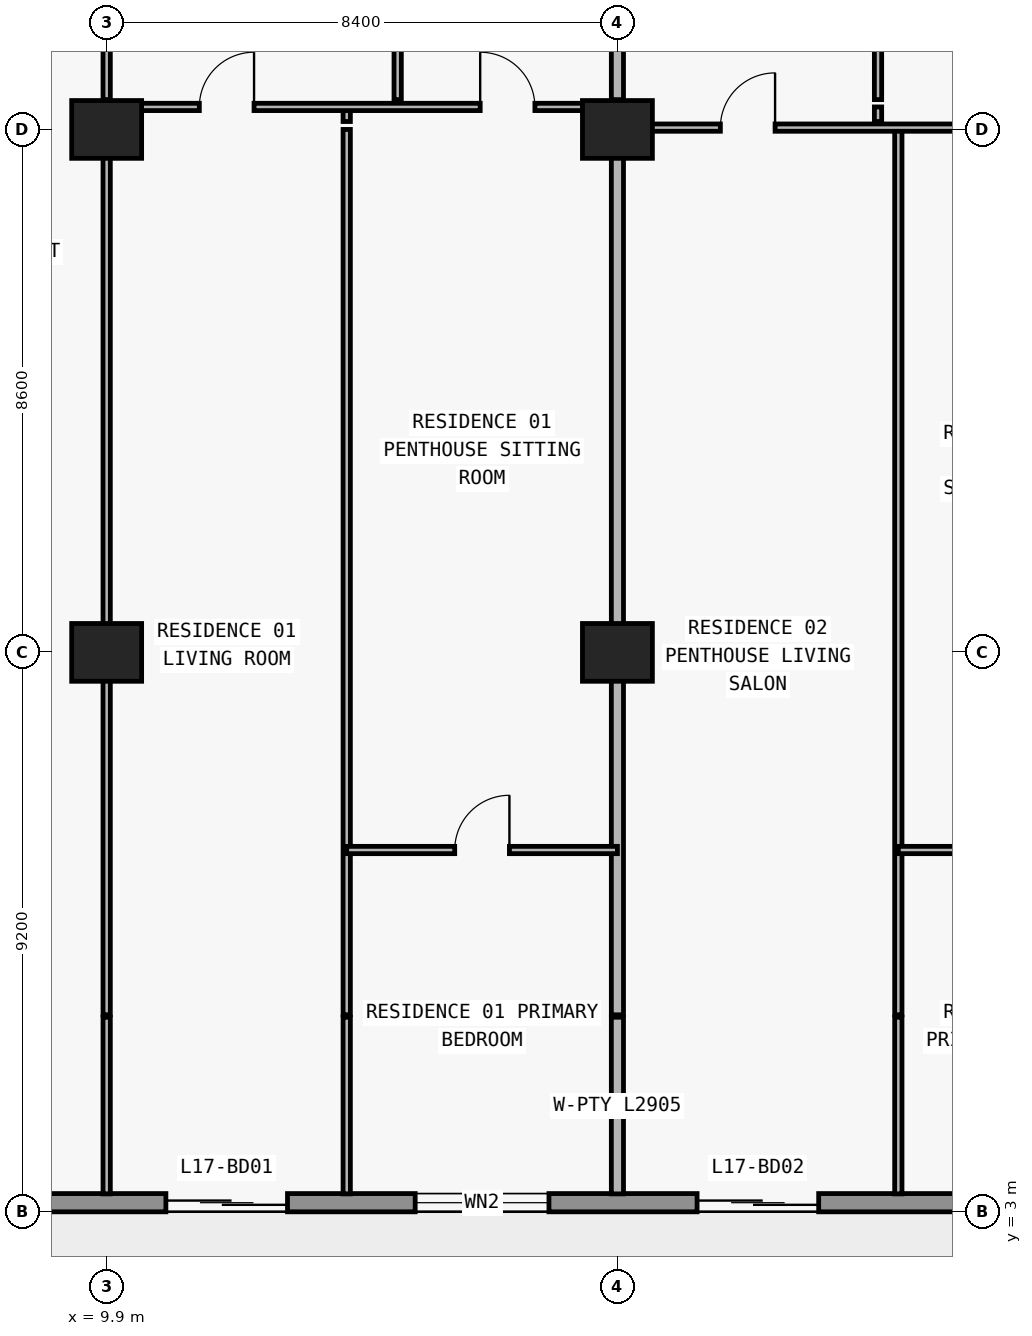
"""IFC4 building model, lengths in metres.
Left out: names, types, materials, properties, quantities, classifications, styles, units other than length and angle.
Written with IfcOpenShell. Run it as: python <this file> out.ifc"""

import sys

from ifc_helpers import new_model, si_unit, direction, frame, frame_2d, origin, origin_2d, place, context, subcontext, project, spatial, rectangle, extrude, element, fill, save


model = new_model("IFC4")
c1 = context("Model", 3, precision=1e-05, world=origin(), true_north=direction((0.0, 1.0)))
c2 = subcontext(c1, "Body", "Model", "MODEL_VIEW")
j1 = project(units=[si_unit("LENGTHUNIT", "METRE"), si_unit("PLANEANGLEUNIT", "RADIAN")], contexts=[c1])
p1 = place(None, origin())
s1 = spatial("IfcSite", under=j1, at=p1, CompositionType="ELEMENT")
p2 = place(p1, origin())
s2 = spatial("IfcBuilding", under=s1, at=p2, CompositionType="ELEMENT")
p3 = place(p2, frame((0.0, 0.0, 66.3)))
s3 = spatial("IfcBuildingStorey", under=s2, at=p3, CompositionType="ELEMENT", Elevation=66.3)
for number, where, z_axis, x_axis in (
    (1, (9.9, 12.2, 0.0), (0.0, 0.0, 1.0), (1.0, 0.0, 0.0)),
    (2, (18.3, 12.2, 0.0), (0.0, 0.0, 1.0), (1.0, 0.0, 0.0)),
    (3, (9.9, 20.8, 0.0), (0.0, 0.0, 1.0), (1.0, 0.0, 0.0)),
    (4, (18.3, 20.8, 0.0), (0.0, 0.0, 1.0), (1.0, 0.0, 0.0)),
):
    element("IfcColumn", number, at=place(p3, frame(where, z_axis=z_axis, x_axis=x_axis)), inside=s3, PredefinedType="COLUMN", context=c2, shape_type="SweptSolid", body=[
        extrude(rectangle(XDim=1.15, YDim=0.95, at=origin_2d()), origin(), (0.0, 0.0, 1.0), 3.05),
    ])
p4 = place(p3, frame((72.7, 3.15, 0.0), z_axis=(0.0, 0.0, 1.0), x_axis=(-1.0, 0.0, 0.0)))
e5 = element("IfcWall", 5, at=p4, inside=s3, PredefinedType="STANDARD", context=c2, shape_type="SweptSolid", body=[
    extrude(rectangle(XDim=67.6, YDim=0.3, at=frame_2d((33.8, 0.0))), origin(), (0.0, 0.0, 1.0), 3.05),
])
p5 = place(p4, frame((59.826, 0.0, 0.0)))
e6 = element("IfcOpeningElement", 6, at=p5, cuts=e5, PredefinedType="OPENING", context=c2, shape_type="SweptSolid", body=[
    extrude(rectangle(XDim=2.0, YDim=2.3, at=frame_2d((1.0, 1.15))), frame((0.0, 0.16, 0.0), z_axis=(0.0, -1.0, 0.0), x_axis=(1.0, 0.0, 0.0)), (0.0, 0.0, 1.0), 0.32),
])
p6 = place(p4, frame((55.526, 0.0, 0.85)))
e7 = element("IfcOpeningElement", 7, at=p6, cuts=e5, PredefinedType="OPENING", context=c2, shape_type="SweptSolid", body=[
    extrude(rectangle(XDim=2.2, YDim=1.55, at=frame_2d((1.1, 0.775))), frame((0.0, 0.16, 0.0), z_axis=(0.0, -1.0, 0.0), x_axis=(1.0, 0.0, 0.0)), (0.0, 0.0, 1.0), 0.32),
])
p7 = place(p4, frame((51.09, 0.0, 0.0)))
e8 = element("IfcOpeningElement", 8, at=p7, cuts=e5, PredefinedType="OPENING", context=c2, shape_type="SweptSolid", body=[
    extrude(rectangle(XDim=2.0, YDim=2.3, at=frame_2d((1.0, 1.15))), frame((0.0, 0.16, 0.0), z_axis=(0.0, -1.0, 0.0), x_axis=(1.0, 0.0, 0.0)), (0.0, 0.0, 1.0), 0.32),
])
p8 = place(p4, frame((46.99, 0.0, 0.85)))
e9 = element("IfcOpeningElement", 9, at=p8, cuts=e5, PredefinedType="OPENING", context=c2, shape_type="SweptSolid", body=[
    extrude(rectangle(XDim=1.8, YDim=1.55, at=frame_2d((0.9, 0.775))), frame((0.0, 0.16, 0.0), z_axis=(0.0, -1.0, 0.0), x_axis=(1.0, 0.0, 0.0)), (0.0, 0.0, 1.0), 0.32),
])
p9 = place(p4, frame((43.026, 0.0, 0.0)))
e10 = element("IfcOpeningElement", 10, at=p9, cuts=e5, PredefinedType="OPENING", context=c2, shape_type="SweptSolid", body=[
    extrude(rectangle(XDim=2.0, YDim=2.3, at=frame_2d((1.0, 1.15))), frame((0.0, 0.16, 0.0), z_axis=(0.0, -1.0, 0.0), x_axis=(1.0, 0.0, 0.0)), (0.0, 0.0, 1.0), 0.32),
])
p10 = place(p4, frame((38.726, 0.0, 0.85)))
e11 = element("IfcOpeningElement", 11, at=p10, cuts=e5, PredefinedType="OPENING", context=c2, shape_type="SweptSolid", body=[
    extrude(rectangle(XDim=2.2, YDim=1.55, at=frame_2d((1.1, 0.775))), frame((0.0, 0.16, 0.0), z_axis=(0.0, -1.0, 0.0), x_axis=(1.0, 0.0, 0.0)), (0.0, 0.0, 1.0), 0.32),
])
p11 = place(p4, frame((34.51, 0.0, 0.0)))
e12 = element("IfcOpeningElement", 12, at=p11, cuts=e5, PredefinedType="OPENING", context=c2, shape_type="SweptSolid", body=[
    extrude(rectangle(XDim=2.0, YDim=2.3, at=frame_2d((1.0, 1.15))), frame((0.0, 0.16, 0.0), z_axis=(0.0, -1.0, 0.0), x_axis=(1.0, 0.0, 0.0)), (0.0, 0.0, 1.0), 0.32),
])
p12 = place(p4, frame((30.81, 0.0, 0.85)))
e13 = element("IfcOpeningElement", 13, at=p12, cuts=e5, PredefinedType="OPENING", context=c2, shape_type="SweptSolid", body=[
    extrude(rectangle(XDim=1.8, YDim=1.55, at=frame_2d((0.9, 0.775))), frame((0.0, 0.16, 0.0), z_axis=(0.0, -1.0, 0.0), x_axis=(1.0, 0.0, 0.0)), (0.0, 0.0, 1.0), 0.32),
])
p13 = place(p4, frame((27.026, 0.0, 0.0)))
e14 = element("IfcOpeningElement", 14, at=p13, cuts=e5, PredefinedType="OPENING", context=c2, shape_type="SweptSolid", body=[
    extrude(rectangle(XDim=2.0, YDim=2.3, at=frame_2d((1.0, 1.15))), frame((0.0, 0.16, 0.0), z_axis=(0.0, -1.0, 0.0), x_axis=(1.0, 0.0, 0.0)), (0.0, 0.0, 1.0), 0.32),
])
p14 = place(p4, frame((22.726, 0.0, 0.85)))
e15 = element("IfcOpeningElement", 15, at=p14, cuts=e5, PredefinedType="OPENING", context=c2, shape_type="SweptSolid", body=[
    extrude(rectangle(XDim=2.2, YDim=1.55, at=frame_2d((1.1, 0.775))), frame((0.0, 0.16, 0.0), z_axis=(0.0, -1.0, 0.0), x_axis=(1.0, 0.0, 0.0)), (0.0, 0.0, 1.0), 0.32),
])
p15 = place(p4, frame((18.29, 0.0, 0.0)))
e16 = element("IfcOpeningElement", 16, at=p15, cuts=e5, PredefinedType="OPENING", context=c2, shape_type="SweptSolid", body=[
    extrude(rectangle(XDim=2.0, YDim=2.3, at=frame_2d((1.0, 1.15))), frame((0.0, 0.16, 0.0), z_axis=(0.0, -1.0, 0.0), x_axis=(1.0, 0.0, 0.0)), (0.0, 0.0, 1.0), 0.32),
])
p16 = place(p4, frame((14.19, 0.0, 0.85)))
e17 = element("IfcOpeningElement", 17, at=p16, cuts=e5, PredefinedType="OPENING", context=c2, shape_type="SweptSolid", body=[
    extrude(rectangle(XDim=1.8, YDim=1.55, at=frame_2d((0.9, 0.775))), frame((0.0, 0.16, 0.0), z_axis=(0.0, -1.0, 0.0), x_axis=(1.0, 0.0, 0.0)), (0.0, 0.0, 1.0), 0.32),
])
p17 = place(p4, frame((10.226, 0.0, 0.0)))
e18 = element("IfcOpeningElement", 18, at=p17, cuts=e5, PredefinedType="OPENING", context=c2, shape_type="SweptSolid", body=[
    extrude(rectangle(XDim=2.0, YDim=2.3, at=frame_2d((1.0, 1.15))), frame((0.0, 0.16, 0.0), z_axis=(0.0, -1.0, 0.0), x_axis=(1.0, 0.0, 0.0)), (0.0, 0.0, 1.0), 0.32),
])
p18 = place(p4, frame((5.926, 0.0, 0.85)))
e19 = element("IfcOpeningElement", 19, at=p18, cuts=e5, PredefinedType="OPENING", context=c2, shape_type="SweptSolid", body=[
    extrude(rectangle(XDim=2.2, YDim=1.55, at=frame_2d((1.1, 0.775))), frame((0.0, 0.16, 0.0), z_axis=(0.0, -1.0, 0.0), x_axis=(1.0, 0.0, 0.0)), (0.0, 0.0, 1.0), 0.32),
])
p19 = place(p3, frame((9.9, 3.295, 0.0), z_axis=(0.0, 0.0, 1.0), x_axis=(0.0, 1.0, 0.0)))
e20 = element("IfcWall", 20, at=p19, inside=s3, PredefinedType="PARTITIONING", context=c2, shape_type="SweptSolid", body=[
    extrude(rectangle(XDim=2.905, YDim=0.12, at=frame_2d((1.453, 0.0))), origin(), (0.0, 0.0, 1.0), 3.05),
])
p20 = place(p3, frame((9.9, 6.24, 0.0), z_axis=(0.0, 0.0, 1.0), x_axis=(0.0, 1.0, 0.0)))
e21 = element("IfcWall", 21, at=p20, inside=s3, PredefinedType="PARTITIONING", context=c2, shape_type="SweptSolid", body=[
    extrude(rectangle(XDim=14.56, YDim=0.12, at=frame_2d((7.28, 0.0))), origin(), (0.0, 0.0, 1.0), 2.11),
])
p21 = place(p3, frame((9.9, 20.93, 0.0), z_axis=(0.0, 0.0, 1.0), x_axis=(0.0, 1.0, 0.0)))
e22 = element("IfcWall", 22, at=p21, inside=s3, PredefinedType="PARTITIONING", context=c2, shape_type="SweptSolid", body=[
    extrude(rectangle(XDim=0.24, YDim=0.12, at=frame_2d((0.12, 0.0))), origin(), (0.0, 0.0, 1.0), 3.05),
])
p22 = place(p3, frame((9.9, 21.29, 0.0), z_axis=(0.0, 0.0, 1.0), x_axis=(0.0, 1.0, 0.0)))
e23 = element("IfcWall", 23, at=p22, inside=s3, PredefinedType="PARTITIONING", context=c2, shape_type="SweptSolid", body=[
    extrude(rectangle(XDim=4.69, YDim=0.12, at=frame_2d((2.345, 0.0))), origin(), (0.0, 0.0, 1.0), 2.11),
])
p23 = place(p22, frame((1.895, 0.0, 0.0)))
e24 = element("IfcOpeningElement", 24, at=p23, cuts=e23, PredefinedType="OPENING", context=c2, shape_type="SweptSolid", body=[
    extrude(rectangle(XDim=0.9, YDim=2.06, at=frame_2d((0.45, 1.03))), frame((0.0, 0.07, 0.0), z_axis=(0.0, -1.0, 0.0), x_axis=(1.0, 0.0, 0.0)), (0.0, 0.0, 1.0), 0.14),
])
p24 = place(p3, frame((13.848, 3.295, 0.0), z_axis=(0.0, 0.0, 1.0), x_axis=(0.0, 1.0, 0.0)))
e25 = element("IfcWall", 25, at=p24, inside=s3, PredefinedType="PARTITIONING", context=c2, shape_type="SweptSolid", body=[
    extrude(rectangle(XDim=2.905, YDim=0.12, at=frame_2d((1.453, 0.0))), origin(), (0.0, 0.0, 1.0), 3.05),
])
p25 = place(p3, frame((13.848, 6.24, 0.0), z_axis=(0.0, 0.0, 1.0), x_axis=(0.0, 1.0, 0.0)))
e26 = element("IfcWall", 26, at=p25, inside=s3, PredefinedType="PARTITIONING", context=c2, shape_type="SweptSolid", body=[
    extrude(rectangle(XDim=14.56, YDim=0.12, at=frame_2d((7.28, 0.0))), origin(), (0.0, 0.0, 1.0), 2.423),
])
p26 = place(p3, frame((13.848, 20.93, 0.0), z_axis=(0.0, 0.0, 1.0), x_axis=(0.0, 1.0, 0.0)))
e27 = element("IfcWall", 27, at=p26, inside=s3, PredefinedType="PARTITIONING", context=c2, shape_type="SweptSolid", body=[
    extrude(rectangle(XDim=0.24, YDim=0.12, at=frame_2d((0.12, 0.0))), origin(), (0.0, 0.0, 1.0), 2.423),
])
p27 = place(p3, frame((14.686, 21.29, 0.0), z_axis=(0.0, 0.0, 1.0), x_axis=(0.0, 1.0, 0.0)))
e28 = element("IfcWall", 28, at=p27, inside=s3, PredefinedType="PARTITIONING", context=c2, shape_type="SweptSolid", body=[
    extrude(rectangle(XDim=4.69, YDim=0.12, at=frame_2d((2.345, 0.0))), origin(), (0.0, 0.0, 1.0), 3.05),
])
p28 = place(p27, frame((1.895, 0.0, 0.0)))
e29 = element("IfcOpeningElement", 29, at=p28, cuts=e28, PredefinedType="OPENING", context=c2, shape_type="SweptSolid", body=[
    extrude(rectangle(XDim=0.9, YDim=2.15, at=frame_2d((0.45, 1.075))), frame((0.0, 0.07, 0.0), z_axis=(0.0, -1.0, 0.0), x_axis=(1.0, 0.0, 0.0)), (0.0, 0.0, 1.0), 0.14),
])
p29 = place(p3, frame((18.3, 3.295, 0.0), z_axis=(0.0, 0.0, 1.0), x_axis=(0.0, 1.0, 0.0)))
e30 = element("IfcWall", 30, at=p29, inside=s3, PredefinedType="PARTITIONING", context=c2, shape_type="SweptSolid", body=[
    extrude(rectangle(XDim=2.905, YDim=0.2, at=frame_2d((1.453, 0.0))), origin(), (0.0, 0.0, 1.0), 3.05),
])
p30 = place(p3, frame((18.3, 6.24, 0.0), z_axis=(0.0, 0.0, 1.0), x_axis=(0.0, 1.0, 0.0)))
e31 = element("IfcWall", 31, at=p30, inside=s3, PredefinedType="PARTITIONING", context=c2, shape_type="SweptSolid", body=[
    extrude(rectangle(XDim=14.56, YDim=0.2, at=frame_2d((7.28, 0.0))), origin(), (0.0, 0.0, 1.0), 2.11),
])
p31 = place(p3, frame((18.3, 20.93, 0.0), z_axis=(0.0, 0.0, 1.0), x_axis=(0.0, 1.0, 0.0)))
e32 = element("IfcWall", 32, at=p31, inside=s3, PredefinedType="PARTITIONING", context=c2, shape_type="SweptSolid", body=[
    extrude(rectangle(XDim=0.24, YDim=0.2, at=frame_2d((0.12, 0.0))), origin(), (0.0, 0.0, 1.0), 3.05),
])
p32 = place(p3, frame((18.3, 21.29, 0.0), z_axis=(0.0, 0.0, 1.0), x_axis=(0.0, 1.0, 0.0)))
e33 = element("IfcWall", 33, at=p32, inside=s3, PredefinedType="PARTITIONING", context=c2, shape_type="SweptSolid", body=[
    extrude(rectangle(XDim=4.69, YDim=0.2, at=frame_2d((2.345, 0.0))), origin(), (0.0, 0.0, 1.0), 2.11),
])
p33 = place(p3, frame((22.586, 20.93, 0.0), z_axis=(0.0, 0.0, 1.0), x_axis=(0.0, 1.0, 0.0)))
e34 = element("IfcWall", 34, at=p33, inside=s3, PredefinedType="PARTITIONING", context=c2, shape_type="SweptSolid", body=[
    extrude(rectangle(XDim=0.24, YDim=0.12, at=frame_2d((0.12, 0.0))), origin(), (0.0, 0.0, 1.0), 2.423),
])
p34 = place(p3, frame((22.586, 21.29, 0.0), z_axis=(0.0, 0.0, 1.0), x_axis=(0.0, 1.0, 0.0)))
e35 = element("IfcWall", 35, at=p34, inside=s3, PredefinedType="PARTITIONING", context=c2, shape_type="SweptSolid", body=[
    extrude(rectangle(XDim=4.69, YDim=0.12, at=frame_2d((2.345, 0.0))), origin(), (0.0, 0.0, 1.0), 2.423),
])
p35 = place(p34, frame((1.895, 0.0, 0.0)))
e36 = element("IfcOpeningElement", 36, at=p35, cuts=e35, PredefinedType="OPENING", context=c2, shape_type="SweptSolid", body=[
    extrude(rectangle(XDim=0.9, YDim=2.15, at=frame_2d((0.45, 1.075))), frame((0.0, 0.07, 0.0), z_axis=(0.0, -1.0, 0.0), x_axis=(1.0, 0.0, 0.0)), (0.0, 0.0, 1.0), 0.14),
])
p36 = place(p3, frame((22.92, 3.295, 0.0), z_axis=(0.0, 0.0, 1.0), x_axis=(0.0, 1.0, 0.0)))
e37 = element("IfcWall", 37, at=p36, inside=s3, PredefinedType="PARTITIONING", context=c2, shape_type="SweptSolid", body=[
    extrude(rectangle(XDim=2.905, YDim=0.12, at=frame_2d((1.453, 0.0))), origin(), (0.0, 0.0, 1.0), 3.05),
])
p37 = place(p3, frame((22.92, 6.24, 0.0), z_axis=(0.0, 0.0, 1.0), x_axis=(0.0, 1.0, 0.0)))
e38 = element("IfcWall", 38, at=p37, inside=s3, PredefinedType="PARTITIONING", context=c2, shape_type="SweptSolid", body=[
    extrude(rectangle(XDim=14.56, YDim=0.12, at=frame_2d((7.28, 0.0))), origin(), (0.0, 0.0, 1.0), 3.05),
])
p38 = place(p3, frame((13.848, 8.95, 0.0), z_axis=(0.0, 0.0, 1.0), x_axis=(1.0, 0.0, 0.0)))
e39 = element("IfcWall", 39, at=p38, inside=s3, PredefinedType="PARTITIONING", context=c2, shape_type="SweptSolid", body=[
    extrude(rectangle(XDim=4.452, YDim=0.12, at=frame_2d((2.226, 0.0))), origin(), (0.0, 0.0, 1.0), 3.05),
])
p39 = place(p38, frame((1.776, 0.0, 0.0)))
e40 = element("IfcOpeningElement", 40, at=p39, cuts=e39, PredefinedType="OPENING", context=c2, shape_type="SweptSolid", body=[
    extrude(rectangle(XDim=0.9, YDim=2.15, at=frame_2d((0.45, 1.075))), frame((0.0, 0.07, 0.0), z_axis=(0.0, -1.0, 0.0), x_axis=(1.0, 0.0, 0.0)), (0.0, 0.0, 1.0), 0.14),
])
p40 = place(p3, frame((22.92, 8.95, 0.0), z_axis=(0.0, 0.0, 1.0), x_axis=(1.0, 0.0, 0.0)))
e41 = element("IfcWall", 41, at=p40, inside=s3, PredefinedType="PARTITIONING", context=c2, shape_type="SweptSolid", body=[
    extrude(rectangle(XDim=3.73, YDim=0.12, at=frame_2d((1.865, 0.0))), origin(), (0.0, 0.0, 1.0), 3.05),
])
p41 = place(p40, frame((1.415, 0.0, 0.0)))
e42 = element("IfcOpeningElement", 42, at=p41, cuts=e41, PredefinedType="OPENING", context=c2, shape_type="SweptSolid", body=[
    extrude(rectangle(XDim=0.9, YDim=2.15, at=frame_2d((0.45, 1.075))), frame((0.0, 0.07, 0.0), z_axis=(0.0, -1.0, 0.0), x_axis=(1.0, 0.0, 0.0)), (0.0, 0.0, 1.0), 0.14),
])
p42 = place(p3, frame((18.3, 20.83, 0.0), z_axis=(0.0, 0.0, 1.0), x_axis=(1.0, 0.0, 0.0)))
e43 = element("IfcWall", 43, at=p42, inside=s3, PredefinedType="PARTITIONING", context=c2, shape_type="SweptSolid", body=[
    extrude(rectangle(XDim=8.13, YDim=0.12, at=frame_2d((4.065, 0.0))), origin(), (0.0, 0.0, 1.0), 2.11),
])
p43 = place(p42, frame((1.693, 0.0, 0.0)))
e44 = element("IfcOpeningElement", 44, at=p43, cuts=e43, PredefinedType="OPENING", context=c2, shape_type="SweptSolid", body=[
    extrude(rectangle(XDim=0.9, YDim=2.06, at=frame_2d((0.45, 1.03))), frame((0.0, 0.07, 0.0), z_axis=(0.0, -1.0, 0.0), x_axis=(1.0, 0.0, 0.0)), (0.0, 0.0, 1.0), 0.14),
])
p44 = place(p42, frame((5.925, 0.0, 0.0)))
e45 = element("IfcOpeningElement", 45, at=p44, cuts=e43, PredefinedType="OPENING", context=c2, shape_type="SweptSolid", body=[
    extrude(rectangle(XDim=0.9, YDim=2.06, at=frame_2d((0.45, 1.03))), frame((0.0, 0.07, 0.0), z_axis=(0.0, -1.0, 0.0), x_axis=(1.0, 0.0, 0.0)), (0.0, 0.0, 1.0), 0.14),
])
p45 = place(p3, frame((9.9, 21.17, 0.0), z_axis=(0.0, 0.0, 1.0), x_axis=(1.0, 0.0, 0.0)))
e46 = element("IfcWall", 46, at=p45, inside=s3, PredefinedType="PARTITIONING", context=c2, shape_type="SweptSolid", body=[
    extrude(rectangle(XDim=8.4, YDim=0.12, at=frame_2d((4.2, 0.0))), origin(), (0.0, 0.0, 1.0), 3.05),
])
p46 = place(p45, frame((1.524, 0.0, 0.0)))
e47 = element("IfcOpeningElement", 47, at=p46, cuts=e46, PredefinedType="OPENING", context=c2, shape_type="SweptSolid", body=[
    extrude(rectangle(XDim=0.9, YDim=2.15, at=frame_2d((0.45, 1.075))), frame((0.0, 0.07, 0.0), z_axis=(0.0, -1.0, 0.0), x_axis=(1.0, 0.0, 0.0)), (0.0, 0.0, 1.0), 0.14),
])
p47 = place(p45, frame((6.143, 0.0, 0.0)))
e48 = element("IfcOpeningElement", 48, at=p47, cuts=e46, PredefinedType="OPENING", context=c2, shape_type="SweptSolid", body=[
    extrude(rectangle(XDim=0.9, YDim=2.15, at=frame_2d((0.45, 1.075))), frame((0.0, 0.07, 0.0), z_axis=(0.0, -1.0, 0.0), x_axis=(1.0, 0.0, 0.0)), (0.0, 0.0, 1.0), 0.14),
])
p48 = place(p5, origin())
e49 = element("IfcDoor", 49, at=p48, inside=s3, OperationType="DOUBLE_DOOR_SLIDING", PredefinedType="DOOR", context=c2, shape_type="SweptSolid", body=[
    extrude(rectangle(XDim=2.0, YDim=2.3, at=frame_2d((1.0, 1.15))), frame((0.0, 0.025, 0.0), z_axis=(0.0, -1.0, 0.0), x_axis=(1.0, 0.0, 0.0)), (0.0, 0.0, 1.0), 0.05),
])
fill(e6, e49)
p49 = place(p6, origin())
e50 = element("IfcWindow", 50, at=p49, inside=s3, PartitioningType="SINGLE_PANEL", PredefinedType="WINDOW", context=c2, shape_type="SweptSolid", body=[
    extrude(rectangle(XDim=2.2, YDim=1.55, at=frame_2d((1.1, 0.775))), frame((0.0, 0.03, 0.0), z_axis=(0.0, -1.0, 0.0), x_axis=(1.0, 0.0, 0.0)), (0.0, 0.0, 1.0), 0.06),
])
fill(e7, e50)
p50 = place(p7, origin())
e51 = element("IfcDoor", 51, at=p50, inside=s3, OperationType="DOUBLE_DOOR_SLIDING", PredefinedType="DOOR", context=c2, shape_type="SweptSolid", body=[
    extrude(rectangle(XDim=2.0, YDim=2.3, at=frame_2d((1.0, 1.15))), frame((0.0, 0.025, 0.0), z_axis=(0.0, -1.0, 0.0), x_axis=(1.0, 0.0, 0.0)), (0.0, 0.0, 1.0), 0.05),
])
fill(e8, e51)
p51 = place(p46, origin())
e52 = element("IfcDoor", 52, at=p51, inside=s3, OperationType="SINGLE_SWING_RIGHT", PredefinedType="DOOR", context=c2, shape_type="SweptSolid", body=[
    extrude(rectangle(XDim=0.9, YDim=2.15, at=frame_2d((0.45, 1.075))), frame((0.0, 0.025, 0.0), z_axis=(0.0, -1.0, 0.0), x_axis=(1.0, 0.0, 0.0)), (0.0, 0.0, 1.0), 0.05),
])
fill(e47, e52)
p52 = place(p47, origin())
e53 = element("IfcDoor", 53, at=p52, inside=s3, OperationType="SINGLE_SWING_LEFT", PredefinedType="DOOR", context=c2, shape_type="SweptSolid", body=[
    extrude(rectangle(XDim=0.9, YDim=2.15, at=frame_2d((0.45, 1.075))), frame((0.0, 0.025, 0.0), z_axis=(0.0, -1.0, 0.0), x_axis=(1.0, 0.0, 0.0)), (0.0, 0.0, 1.0), 0.05),
])
fill(e48, e53)
p53 = place(p39, origin())
e54 = element("IfcDoor", 54, at=p53, inside=s3, OperationType="SINGLE_SWING_RIGHT", PredefinedType="DOOR", context=c2, shape_type="SweptSolid", body=[
    extrude(rectangle(XDim=0.9, YDim=2.15, at=frame_2d((0.45, 1.075))), frame((0.0, 0.025, 0.0), z_axis=(0.0, -1.0, 0.0), x_axis=(1.0, 0.0, 0.0)), (0.0, 0.0, 1.0), 0.05),
])
fill(e40, e54)
p54 = place(p43, origin())
e55 = element("IfcDoor", 55, at=p54, inside=s3, OperationType="SINGLE_SWING_RIGHT", PredefinedType="DOOR", context=c2, shape_type="SweptSolid", body=[
    extrude(rectangle(XDim=0.9, YDim=2.06, at=frame_2d((0.45, 1.03))), frame((0.0, 0.025, 0.0), z_axis=(0.0, -1.0, 0.0), x_axis=(1.0, 0.0, 0.0)), (0.0, 0.0, 1.0), 0.05),
])
fill(e44, e55)
save(model, sys.argv[1])
